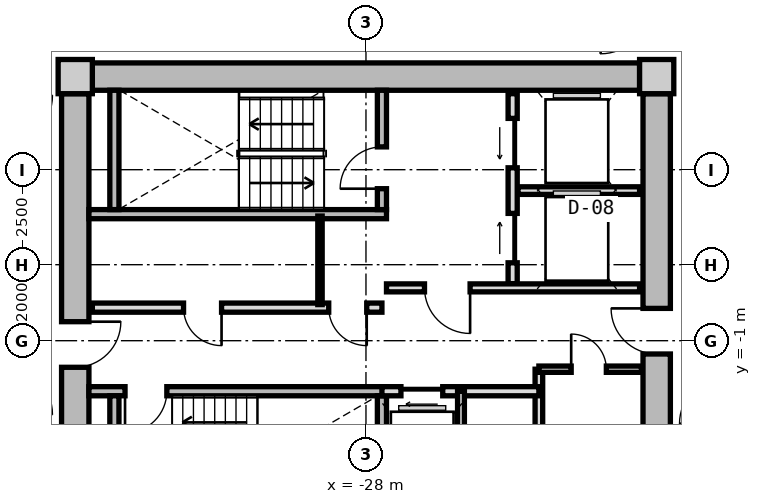
"""IFC4 building model, lengths in metres.
Left out: names, types, materials, properties, quantities, classifications, styles, units other than length and angle.
Written with IfcOpenShell. Run it as: python <this file> out.ifc"""

import sys

from ifc_helpers import new_model, si_unit, direction, frame, frame_2d, origin, origin_2d, place, context, subcontext, project, spatial, rectangle, extrude, source, transform, mapped, element, fill, save


model = new_model("IFC4")
c1 = context("Model", 3, precision=1e-05, world=origin(), true_north=direction((0.0, 1.0)))
c2 = subcontext(c1, "Body", "Model", "MODEL_VIEW")
j1 = project(units=[si_unit("LENGTHUNIT", "METRE"), si_unit("PLANEANGLEUNIT", "RADIAN")], contexts=[c1])
p1 = place(None, origin())
s1 = spatial("IfcSite", under=j1, at=p1, CompositionType="ELEMENT")
p2 = place(p1, origin())
s2 = spatial("IfcBuilding", under=s1, at=p2, CompositionType="ELEMENT")
p3 = place(p2, frame((0.0, 0.0, 99.3)))
s3 = spatial("IfcBuildingStorey", under=s2, at=p3, CompositionType="ELEMENT", Elevation=99.3)
m1 = source(origin(), c2, "Body", "SweptSolid", [
    extrude(rectangle(XDim=0.9, YDim=0.9, at=origin_2d()), origin(), (0.0, 0.0, 1.0), 3.05),
])
for number, where, z_axis, x_axis in (
    (1, (-20.35, 5.95, 0.0), (0.0, 0.0, 1.0), (1.0, 0.0, 0.0)),
    (2, (-35.65, 5.95, 0.0), (0.0, 0.0, 1.0), (1.0, 0.0, 0.0)),
):
    element("IfcColumn", number, at=place(p3, frame(where, z_axis=z_axis, x_axis=x_axis)), inside=s3, PredefinedType="COLUMN", context=c2, shape_type="MappedRepresentation", body=[
        mapped(m1, transform((0.0, 0.0, 0.0), x_axis=(1.0, 0.0, 0.0), y_axis=(0.0, 1.0, 0.0), z_axis=(0.0, 0.0, 1.0), scale=1.0)),
    ])
m2 = source(origin(), c2, "Body", "SweptSolid", [
    extrude(rectangle(XDim=14.4, YDim=0.72, at=frame_2d((7.2, 0.0))), origin(), (0.0, 0.0, 1.0), 2.79),
])
p4 = place(p3, frame((-35.2, 5.95, 0.0), z_axis=(0.0, 0.0, 1.0), x_axis=(1.0, 0.0, 0.0)))
e3 = element("IfcWall", 3, at=p4, inside=s3, PredefinedType="SHEAR", context=c2, shape_type="MappedRepresentation", body=[
    mapped(m2, transform((0.0, 0.0, 0.0), x_axis=(1.0, 0.0, 0.0), y_axis=(0.0, 1.0, 0.0), z_axis=(0.0, 0.0, 1.0), scale=1.0)),
])
m3 = source(origin(), c2, "Body", "SweptSolid", [
    extrude(rectangle(XDim=11.0, YDim=0.72, at=frame_2d((5.5, 0.0))), origin(), (0.0, 0.0, 1.0), 2.79),
])
p5 = place(p3, frame((-35.65, -5.5, 0.0), z_axis=(0.0, 0.0, 1.0), x_axis=(0.0, 1.0, 0.0)))
e4 = element("IfcWall", 4, at=p5, inside=s3, PredefinedType="SHEAR", context=c2, shape_type="MappedRepresentation", body=[
    mapped(m3, transform((0.0, 0.0, 0.0), x_axis=(1.0, 0.0, 0.0), y_axis=(0.0, 1.0, 0.0), z_axis=(0.0, 0.0, 1.0), scale=1.0)),
])
p6 = place(p5, frame((3.8, 0.0, 0.0)))
e5 = element("IfcOpeningElement", 5, at=p6, cuts=e4, PredefinedType="OPENING", context=c2, shape_type="SweptSolid", body=[
    extrude(rectangle(XDim=1.2, YDim=2.15, at=frame_2d((0.6, 1.075))), frame((0.0, 0.37, 0.0), z_axis=(0.0, -1.0, 0.0), x_axis=(1.0, 0.0, 0.0)), (0.0, 0.0, 1.0), 0.74),
])
p7 = place(p3, frame((-20.35, 5.5, 0.0), z_axis=(0.0, 0.0, 1.0), x_axis=(0.0, -1.0, 0.0)))
e6 = element("IfcWall", 6, at=p7, inside=s3, PredefinedType="SHEAR", context=c2, shape_type="MappedRepresentation", body=[
    mapped(m3, transform((0.0, 0.0, 0.0), x_axis=(1.0, 0.0, 0.0), y_axis=(0.0, 1.0, 0.0), z_axis=(0.0, 0.0, 1.0), scale=1.0)),
])
p8 = place(p7, frame((5.65, 0.0, 0.0)))
e7 = element("IfcOpeningElement", 7, at=p8, cuts=e6, PredefinedType="OPENING", context=c2, shape_type="SweptSolid", body=[
    extrude(rectangle(XDim=1.2, YDim=2.15, at=frame_2d((0.6, 1.075))), frame((0.0, 0.37, 0.0), z_axis=(0.0, -1.0, 0.0), x_axis=(1.0, 0.0, 0.0)), (0.0, 0.0, 1.0), 0.74),
])
m4 = source(origin(), c2, "Body", "SweptSolid", [
    extrude(rectangle(XDim=7.83, YDim=0.24, at=frame_2d((3.915, 0.0))), origin(), (0.0, 0.0, 1.0), 2.79),
])
p9 = place(p3, frame((-35.29, 2.33, 0.0), z_axis=(0.0, 0.0, 1.0), x_axis=(1.0, 0.0, 0.0)))
e8 = element("IfcWall", 8, at=p9, inside=s3, PredefinedType="PARTITIONING", context=c2, shape_type="MappedRepresentation", body=[
    mapped(m4, transform((0.0, 0.0, 0.0), x_axis=(1.0, 0.0, 0.0), y_axis=(0.0, 1.0, 0.0), z_axis=(0.0, 0.0, 1.0), scale=1.0)),
])
m5 = source(origin(), c2, "Body", "SweptSolid", [
    extrude(rectangle(XDim=3.14, YDim=0.24, at=frame_2d((1.57, 0.0))), origin(), (0.0, 0.0, 1.0), 2.79),
])
p10 = place(p3, frame((-34.62, 2.45, 0.0), z_axis=(0.0, 0.0, 1.0), x_axis=(0.0, 1.0, 0.0)))
e9 = element("IfcWall", 9, at=p10, inside=s3, PredefinedType="PARTITIONING", context=c2, shape_type="MappedRepresentation", body=[
    mapped(m5, transform((0.0, 0.0, 0.0), x_axis=(1.0, 0.0, 0.0), y_axis=(0.0, 1.0, 0.0), z_axis=(0.0, 0.0, 1.0), scale=1.0)),
])
p11 = place(p3, frame((-27.58, 2.45, 0.0), z_axis=(0.0, 0.0, 1.0), x_axis=(0.0, 1.0, 0.0)))
e10 = element("IfcWall", 10, at=p11, inside=s3, PredefinedType="PARTITIONING", context=c2, shape_type="MappedRepresentation", body=[
    mapped(m5, transform((0.0, 0.0, 0.0), x_axis=(1.0, 0.0, 0.0), y_axis=(0.0, 1.0, 0.0), z_axis=(0.0, 0.0, 1.0), scale=1.0)),
])
p12 = place(p11, frame((0.55, 0.0, 0.0)))
e11 = element("IfcOpeningElement", 11, at=p12, cuts=e10, PredefinedType="OPENING", context=c2, shape_type="SweptSolid", body=[
    extrude(rectangle(XDim=1.1, YDim=2.15, at=frame_2d((0.55, 1.075))), frame((0.0, 0.13, 0.0), z_axis=(0.0, -1.0, 0.0), x_axis=(1.0, 0.0, 0.0)), (0.0, 0.0, 1.0), 0.26),
])
p13 = place(p3, frame((-35.29, -2.33, 0.0), z_axis=(0.0, 0.0, 1.0), x_axis=(1.0, 0.0, 0.0)))
e12 = element("IfcWall", 12, at=p13, inside=s3, PredefinedType="PARTITIONING", context=c2, shape_type="MappedRepresentation", body=[
    mapped(m4, transform((0.0, 0.0, 0.0), x_axis=(1.0, 0.0, 0.0), y_axis=(0.0, 1.0, 0.0), z_axis=(0.0, 0.0, 1.0), scale=1.0)),
])
p14 = place(p13, frame((0.95, 0.0, 0.0)))
e13 = element("IfcOpeningElement", 13, at=p14, cuts=e12, PredefinedType="OPENING", context=c2, shape_type="SweptSolid", body=[
    extrude(rectangle(XDim=1.1, YDim=2.15, at=frame_2d((0.55, 1.075))), frame((0.0, 0.13, 0.0), z_axis=(0.0, -1.0, 0.0), x_axis=(1.0, 0.0, 0.0)), (0.0, 0.0, 1.0), 0.26),
])
for number, where, z_axis, x_axis in (
    (14, (-34.62, -5.59, 0.0), (0.0, 0.0, 1.0), (0.0, 1.0, 0.0)),
    (15, (-27.58, -5.59, 0.0), (0.0, 0.0, 1.0), (0.0, 1.0, 0.0)),
):
    element("IfcWall", number, at=place(p3, frame(where, z_axis=z_axis, x_axis=x_axis)), inside=s3, PredefinedType="PARTITIONING", context=c2, shape_type="MappedRepresentation", body=[
        mapped(m5, transform((0.0, 0.0, 0.0), x_axis=(1.0, 0.0, 0.0), y_axis=(0.0, 1.0, 0.0), z_axis=(0.0, 0.0, 1.0), scale=1.0)),
    ])
m6 = source(origin(), c2, "Body", "SweptSolid", [
    extrude(rectangle(XDim=5.0, YDim=0.24, at=frame_2d((2.5, 0.0))), origin(), (0.0, 0.0, 1.0), 2.775),
])
p15 = place(p3, frame((-24.14, 0.5, 0.0), z_axis=(0.0, 0.0, 1.0), x_axis=(0.0, 1.0, 0.0)))
e16 = element("IfcWall", 16, at=p15, inside=s3, PredefinedType="PARTITIONING", context=c2, shape_type="MappedRepresentation", body=[
    mapped(m6, transform((0.0, 0.0, 0.0), x_axis=(1.0, 0.0, 0.0), y_axis=(0.0, 1.0, 0.0), z_axis=(0.0, 0.0, 1.0), scale=1.0)),
])
p16 = place(p15, frame((3.05, 0.0, 0.0)))
e17 = element("IfcOpeningElement", 17, at=p16, cuts=e16, PredefinedType="OPENING", context=c2, shape_type="SweptSolid", body=[
    extrude(rectangle(XDim=1.3, YDim=2.2, at=frame_2d((0.65, 1.1))), frame((0.0, 0.13, 0.0), z_axis=(0.0, -1.0, 0.0), x_axis=(1.0, 0.0, 0.0)), (0.0, 0.0, 1.0), 0.26),
])
p17 = place(p15, frame((0.55, 0.0, 0.0)))
e18 = element("IfcOpeningElement", 18, at=p17, cuts=e16, PredefinedType="OPENING", context=c2, shape_type="SweptSolid", body=[
    extrude(rectangle(XDim=1.3, YDim=2.2, at=frame_2d((0.65, 1.1))), frame((0.0, 0.13, 0.0), z_axis=(0.0, -1.0, 0.0), x_axis=(1.0, 0.0, 0.0)), (0.0, 0.0, 1.0), 0.26),
])
m7 = source(origin(), c2, "Body", "SweptSolid", [
    extrude(rectangle(XDim=3.2, YDim=0.2, at=frame_2d((1.6, 0.0))), origin(), (0.0, 0.0, 1.0), 2.775),
])
p18 = place(p3, frame((-24.0, 2.95, 0.0), z_axis=(0.0, 0.0, 1.0), x_axis=(1.0, 0.0, 0.0)))
e19 = element("IfcWall", 19, at=p18, inside=s3, PredefinedType="PARTITIONING", context=c2, shape_type="MappedRepresentation", body=[
    mapped(m7, transform((0.0, 0.0, 0.0), x_axis=(1.0, 0.0, 0.0), y_axis=(0.0, 1.0, 0.0), z_axis=(0.0, 0.0, 1.0), scale=1.0)),
])
m8 = source(origin(), c2, "Body", "SweptSolid", [
    extrude(rectangle(XDim=6.66, YDim=0.21, at=frame_2d((3.33, 0.0))), origin(), (0.0, 0.0, 1.0), 2.775),
])
p19 = place(p3, frame((-27.46, 0.39, 0.0), z_axis=(0.0, 0.0, 1.0), x_axis=(1.0, 0.0, 0.0)))
e20 = element("IfcWall", 20, at=p19, inside=s3, PredefinedType="PARTITIONING", context=c2, shape_type="MappedRepresentation", body=[
    mapped(m8, transform((0.0, 0.0, 0.0), x_axis=(1.0, 0.0, 0.0), y_axis=(0.0, 1.0, 0.0), z_axis=(0.0, 0.0, 1.0), scale=1.0)),
])
p20 = place(p19, frame((1.0, 0.0, 0.0)))
e21 = element("IfcOpeningElement", 21, at=p20, cuts=e20, PredefinedType="OPENING", context=c2, shape_type="SweptSolid", body=[
    extrude(rectangle(XDim=1.2, YDim=2.15, at=frame_2d((0.6, 1.075))), frame((0.0, 0.115, 0.0), z_axis=(0.0, -1.0, 0.0), x_axis=(1.0, 0.0, 0.0)), (0.0, 0.0, 1.0), 0.23),
])
m9 = source(origin(), c2, "Body", "SweptSolid", [
    extrude(rectangle(XDim=7.62, YDim=0.24, at=frame_2d((3.81, 0.0))), origin(), (0.0, 0.0, 1.0), 2.775),
])
p21 = place(p3, frame((-35.2, -0.13, 0.0), z_axis=(0.0, 0.0, 1.0), x_axis=(1.0, 0.0, 0.0)))
e22 = element("IfcWall", 22, at=p21, inside=s3, PredefinedType="PARTITIONING", context=c2, shape_type="MappedRepresentation", body=[
    mapped(m9, transform((0.0, 0.0, 0.0), x_axis=(1.0, 0.0, 0.0), y_axis=(0.0, 1.0, 0.0), z_axis=(0.0, 0.0, 1.0), scale=1.0)),
])
p22 = place(p21, frame((6.22, 0.0, 0.0)))
e23 = element("IfcOpeningElement", 23, at=p22, cuts=e22, PredefinedType="OPENING", context=c2, shape_type="SweptSolid", body=[
    extrude(rectangle(XDim=1.0, YDim=2.1, at=frame_2d((0.5, 1.05))), frame((0.0, 0.13, 0.0), z_axis=(0.0, -1.0, 0.0), x_axis=(1.0, 0.0, 0.0)), (0.0, 0.0, 1.0), 0.26),
])
p23 = place(p21, frame((2.4, 0.0, 0.0)))
e24 = element("IfcOpeningElement", 24, at=p23, cuts=e22, PredefinedType="OPENING", context=c2, shape_type="SweptSolid", body=[
    extrude(rectangle(XDim=1.0, YDim=2.1, at=frame_2d((0.5, 1.05))), frame((0.0, 0.13, 0.0), z_axis=(0.0, -1.0, 0.0), x_axis=(1.0, 0.0, 0.0)), (0.0, 0.0, 1.0), 0.26),
])
m10 = source(origin(), c2, "Body", "SweptSolid", [
    extrude(rectangle(XDim=2.33, YDim=0.115, at=frame_2d((1.165, 0.0))), origin(), (0.0, 0.0, 1.0), 2.775),
])
p24 = place(p3, frame((-29.21, -0.05, 0.0), z_axis=(0.0, 0.0, 1.0), x_axis=(0.0, 1.0, 0.0)))
e25 = element("IfcWall", 25, at=p24, inside=s3, PredefinedType="PARTITIONING", context=c2, shape_type="MappedRepresentation", body=[
    mapped(m10, transform((0.0, 0.0, 0.0), x_axis=(1.0, 0.0, 0.0), y_axis=(0.0, 1.0, 0.0), z_axis=(0.0, 0.0, 1.0), scale=1.0)),
])
m11 = source(origin(), c2, "Body", "SweptSolid", [
    extrude(rectangle(XDim=3.8, YDim=0.2, at=frame_2d((1.9, 0.0))), origin(), (0.0, 0.0, 1.0), 2.775),
])
p25 = place(p3, frame((-23.45, -5.55, 0.0), z_axis=(0.0, 0.0, 1.0), x_axis=(0.0, 1.0, 0.0)))
e26 = element("IfcWall", 26, at=p25, inside=s3, PredefinedType="PARTITIONING", context=c2, shape_type="MappedRepresentation", body=[
    mapped(m11, transform((0.0, 0.0, 0.0), x_axis=(1.0, 0.0, 0.0), y_axis=(0.0, 1.0, 0.0), z_axis=(0.0, 0.0, 1.0), scale=1.0)),
])
m12 = source(origin(), c2, "Body", "SweptSolid", [
    extrude(rectangle(XDim=4.13, YDim=0.24, at=frame_2d((2.065, 0.0))), origin(), (0.0, 0.0, 1.0), 2.775),
])
p26 = place(p3, frame((-27.58, -2.33, 0.0), z_axis=(0.0, 0.0, 1.0), x_axis=(1.0, 0.0, 0.0)))
e27 = element("IfcWall", 27, at=p26, inside=s3, PredefinedType="PARTITIONING", context=c2, shape_type="MappedRepresentation", body=[
    mapped(m12, transform((0.0, 0.0, 0.0), x_axis=(1.0, 0.0, 0.0), y_axis=(0.0, 1.0, 0.0), z_axis=(0.0, 0.0, 1.0), scale=1.0)),
])
p27 = place(p26, frame((0.5, 0.0, 0.0)))
e28 = element("IfcOpeningElement", 28, at=p27, cuts=e27, PredefinedType="OPENING", context=c2, shape_type="SweptSolid", body=[
    extrude(rectangle(XDim=1.1, YDim=2.2, at=frame_2d((0.55, 1.1))), frame((0.0, 0.13, 0.0), z_axis=(0.0, -1.0, 0.0), x_axis=(1.0, 0.0, 0.0)), (0.0, 0.0, 1.0), 0.26),
])
m13 = source(origin(), c2, "Body", "SweptSolid", [
    extrude(rectangle(XDim=3.22, YDim=0.18, at=frame_2d((1.61, 0.0))), origin(), (0.0, 0.0, 1.0), 2.775),
])
p28 = place(p3, frame((-25.5, -5.55, 0.0), z_axis=(0.0, 0.0, 1.0), x_axis=(0.0, 1.0, 0.0)))
e29 = element("IfcWall", 29, at=p28, inside=s3, PredefinedType="PARTITIONING", context=c2, shape_type="MappedRepresentation", body=[
    mapped(m13, transform((0.0, 0.0, 0.0), x_axis=(1.0, 0.0, 0.0), y_axis=(0.0, 1.0, 0.0), z_axis=(0.0, 0.0, 1.0), scale=1.0)),
])
m14 = source(origin(), c2, "Body", "SweptSolid", [
    extrude(rectangle(XDim=2.7, YDim=0.165, at=frame_2d((1.35, 0.0))), origin(), (0.0, 0.0, 1.0), 2.775),
])
p29 = place(p3, frame((-23.45, -1.75, 0.0), z_axis=(0.0, 0.0, 1.0), x_axis=(1.0, 0.0, 0.0)))
e30 = element("IfcWall", 30, at=p29, inside=s3, PredefinedType="PARTITIONING", context=c2, shape_type="MappedRepresentation", body=[
    mapped(m14, transform((0.0, 0.0, 0.0), x_axis=(1.0, 0.0, 0.0), y_axis=(0.0, 1.0, 0.0), z_axis=(0.0, 0.0, 1.0), scale=1.0)),
])
p30 = place(p29, frame((0.85, 0.0, 0.0)))
e31 = element("IfcOpeningElement", 31, at=p30, cuts=e30, PredefinedType="OPENING", context=c2, shape_type="SweptSolid", body=[
    extrude(rectangle(XDim=0.925, YDim=2.1, at=frame_2d((0.462, 1.05))), frame((0.0, 0.093, 0.0), z_axis=(0.0, -1.0, 0.0), x_axis=(1.0, 0.0, 0.0)), (0.0, 0.0, 1.0), 0.185),
])
m15 = source(origin(), c2, "Body", "SweptSolid", [
    extrude(rectangle(XDim=1.1, YDim=2.15, at=frame_2d((0.55, 1.075))), frame((0.0, 0.025, 0.0), z_axis=(0.0, -1.0, 0.0), x_axis=(1.0, 0.0, 0.0)), (0.0, 0.0, 1.0), 0.05),
])
p31 = place(p12, origin())
e32 = element("IfcDoor", 32, at=p31, inside=s3, OperationType="SINGLE_SWING_LEFT", PredefinedType="DOOR", context=c2, shape_type="MappedRepresentation", body=[
    mapped(m15, transform((0.0, 0.0, 0.0), x_axis=(1.0, 0.0, 0.0), y_axis=(0.0, 1.0, 0.0), z_axis=(0.0, 0.0, 1.0), scale=1.0)),
])
fill(e11, e32)
p32 = place(p14, frame((1.1, 0.0, 0.0), z_axis=(0.0, 0.0, 1.0), x_axis=(-1.0, 0.0, 0.0)))
e33 = element("IfcDoor", 33, at=p32, inside=s3, OperationType="SINGLE_SWING_RIGHT", PredefinedType="DOOR", context=c2, shape_type="MappedRepresentation", body=[
    mapped(m15, transform((0.0, 0.0, 0.0), x_axis=(1.0, 0.0, 0.0), y_axis=(0.0, 1.0, 0.0), z_axis=(0.0, 0.0, 1.0), scale=1.0)),
])
fill(e13, e33)
m16 = source(origin(), c2, "Body", "SweptSolid", [
    extrude(rectangle(XDim=1.3, YDim=2.2, at=frame_2d((0.65, 1.1))), frame((0.0, 0.025, 0.0), z_axis=(0.0, -1.0, 0.0), x_axis=(1.0, 0.0, 0.0)), (0.0, 0.0, 1.0), 0.05),
])
p33 = place(p16, origin())
e34 = element("IfcDoor", 34, at=p33, inside=s3, OperationType="SLIDING_TO_LEFT", PredefinedType="DOOR", context=c2, shape_type="MappedRepresentation", body=[
    mapped(m16, transform((0.0, 0.0, 0.0), x_axis=(1.0, 0.0, 0.0), y_axis=(0.0, 1.0, 0.0), z_axis=(0.0, 0.0, 1.0), scale=1.0)),
])
fill(e17, e34)
p34 = place(p17, origin())
e35 = element("IfcDoor", 35, at=p34, inside=s3, OperationType="SLIDING_TO_RIGHT", PredefinedType="DOOR", context=c2, shape_type="MappedRepresentation", body=[
    mapped(m16, transform((0.0, 0.0, 0.0), x_axis=(1.0, 0.0, 0.0), y_axis=(0.0, 1.0, 0.0), z_axis=(0.0, 0.0, 1.0), scale=1.0)),
])
fill(e18, e35)
m17 = source(origin(), c2, "Body", "SweptSolid", [
    extrude(rectangle(XDim=1.2, YDim=2.15, at=frame_2d((0.6, 1.075))), frame((0.0, 0.025, 0.0), z_axis=(0.0, -1.0, 0.0), x_axis=(1.0, 0.0, 0.0)), (0.0, 0.0, 1.0), 0.05),
])
p35 = place(p20, frame((1.2, 0.0, 0.0), z_axis=(0.0, 0.0, 1.0), x_axis=(-1.0, 0.0, 0.0)))
e36 = element("IfcDoor", 36, at=p35, inside=s3, OperationType="SINGLE_SWING_LEFT", PredefinedType="DOOR", context=c2, shape_type="MappedRepresentation", body=[
    mapped(m17, transform((0.0, 0.0, 0.0), x_axis=(1.0, 0.0, 0.0), y_axis=(0.0, 1.0, 0.0), z_axis=(0.0, 0.0, 1.0), scale=1.0)),
])
fill(e21, e36)
p36 = place(p6, frame((1.2, 0.0, 0.0), z_axis=(0.0, 0.0, 1.0), x_axis=(-1.0, 0.0, 0.0)))
e37 = element("IfcDoor", 37, at=p36, inside=s3, OperationType="SINGLE_SWING_LEFT", PredefinedType="DOOR", context=c2, shape_type="MappedRepresentation", body=[
    mapped(m17, transform((0.0, 0.0, 0.0), x_axis=(1.0, 0.0, 0.0), y_axis=(0.0, 1.0, 0.0), z_axis=(0.0, 0.0, 1.0), scale=1.0)),
])
fill(e5, e37)
p37 = place(p8, frame((1.2, 0.0, 0.0), z_axis=(0.0, 0.0, 1.0), x_axis=(-1.0, 0.0, 0.0)))
e38 = element("IfcDoor", 38, at=p37, inside=s3, OperationType="SINGLE_SWING_RIGHT", PredefinedType="DOOR", context=c2, shape_type="MappedRepresentation", body=[
    mapped(m17, transform((0.0, 0.0, 0.0), x_axis=(1.0, 0.0, 0.0), y_axis=(0.0, 1.0, 0.0), z_axis=(0.0, 0.0, 1.0), scale=1.0)),
])
fill(e7, e38)
m18 = source(origin(), c2, "Body", "SweptSolid", [
    extrude(rectangle(XDim=1.0, YDim=2.1, at=frame_2d((0.5, 1.05))), frame((0.0, 0.025, 0.0), z_axis=(0.0, -1.0, 0.0), x_axis=(1.0, 0.0, 0.0)), (0.0, 0.0, 1.0), 0.05),
])
p38 = place(p22, frame((1.0, 0.0, 0.0), z_axis=(0.0, 0.0, 1.0), x_axis=(-1.0, 0.0, 0.0)))
e39 = element("IfcDoor", 39, at=p38, inside=s3, OperationType="SINGLE_SWING_LEFT", PredefinedType="DOOR", context=c2, shape_type="MappedRepresentation", body=[
    mapped(m18, transform((0.0, 0.0, 0.0), x_axis=(1.0, 0.0, 0.0), y_axis=(0.0, 1.0, 0.0), z_axis=(0.0, 0.0, 1.0), scale=1.0)),
])
fill(e23, e39)
p39 = place(p23, frame((1.0, 0.0, 0.0), z_axis=(0.0, 0.0, 1.0), x_axis=(-1.0, 0.0, 0.0)))
e40 = element("IfcDoor", 40, at=p39, inside=s3, OperationType="SINGLE_SWING_LEFT", PredefinedType="DOOR", context=c2, shape_type="MappedRepresentation", body=[
    mapped(m18, transform((0.0, 0.0, 0.0), x_axis=(1.0, 0.0, 0.0), y_axis=(0.0, 1.0, 0.0), z_axis=(0.0, 0.0, 1.0), scale=1.0)),
])
fill(e24, e40)
m19 = source(origin(), c2, "Body", "SweptSolid", [
    extrude(rectangle(XDim=1.1, YDim=2.2, at=frame_2d((0.55, 1.1))), frame((0.0, 0.025, 0.0), z_axis=(0.0, -1.0, 0.0), x_axis=(1.0, 0.0, 0.0)), (0.0, 0.0, 1.0), 0.05),
])
p40 = place(p27, frame((1.1, 0.0, 0.0), z_axis=(0.0, 0.0, 1.0), x_axis=(-1.0, 0.0, 0.0)))
e41 = element("IfcDoor", 41, at=p40, inside=s3, OperationType="SLIDING_TO_LEFT", PredefinedType="DOOR", context=c2, shape_type="MappedRepresentation", body=[
    mapped(m19, transform((0.0, 0.0, 0.0), x_axis=(1.0, 0.0, 0.0), y_axis=(0.0, 1.0, 0.0), z_axis=(0.0, 0.0, 1.0), scale=1.0)),
])
fill(e28, e41)
m20 = source(origin(), c2, "Body", "SweptSolid", [
    extrude(rectangle(XDim=0.925, YDim=2.1, at=frame_2d((0.462, 1.05))), frame((0.0, 0.025, 0.0), z_axis=(0.0, -1.0, 0.0), x_axis=(1.0, 0.0, 0.0)), (0.0, 0.0, 1.0), 0.05),
])
p41 = place(p30, origin())
e42 = element("IfcDoor", 42, at=p41, inside=s3, OperationType="SINGLE_SWING_LEFT", PredefinedType="DOOR", context=c2, shape_type="MappedRepresentation", body=[
    mapped(m20, transform((0.0, 0.0, 0.0), x_axis=(1.0, 0.0, 0.0), y_axis=(0.0, 1.0, 0.0), z_axis=(0.0, 0.0, 1.0), scale=1.0)),
])
fill(e31, e42)
save(model, sys.argv[1])
